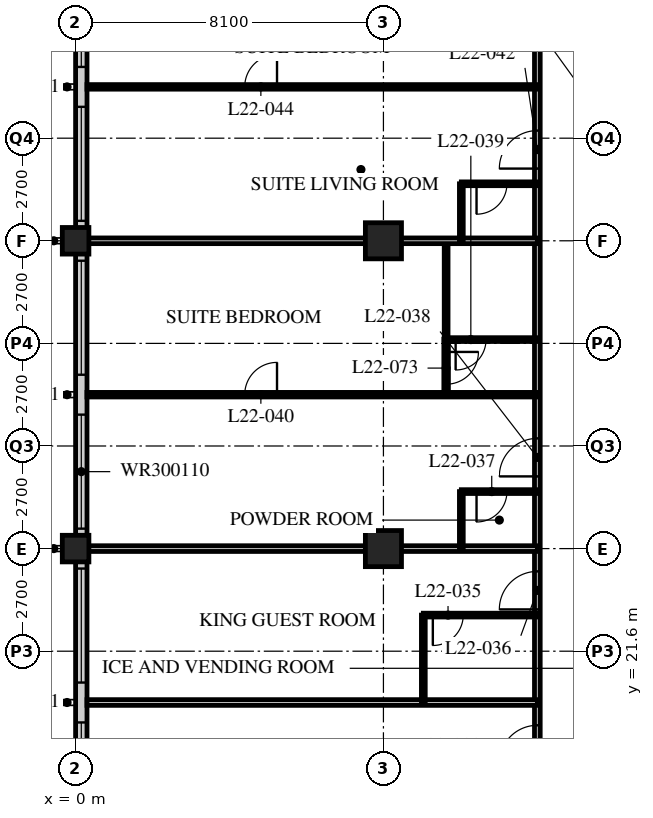
"""IFC4 building model, lengths in metres.
Left out: names, types, materials, properties, quantities, classifications, styles, units other than length and angle.
Written with IfcOpenShell. Run it as: python <this file> out.ifc"""

import sys

from ifc_helpers import new_model, si_unit, direction, frame, frame_2d, origin, origin_2d, place, context, subcontext, project, spatial, rectangle, hollow_rectangle, extrude, element, fill, save


model = new_model("IFC4")
c1 = context("Model", 3, precision=1e-05, world=origin(), true_north=direction((0.0, 1.0)))
c2 = subcontext(c1, "Body", "Model", "MODEL_VIEW")
j1 = project(units=[si_unit("LENGTHUNIT", "METRE"), si_unit("PLANEANGLEUNIT", "RADIAN")], contexts=[c1])
p1 = place(None, origin())
s1 = spatial("IfcSite", under=j1, at=p1, CompositionType="ELEMENT")
p2 = place(p1, origin())
s2 = spatial("IfcBuilding", under=s1, at=p2, CompositionType="ELEMENT")
p3 = place(p2, frame((0.0, 0.0, 87.4)))
s3 = spatial("IfcBuildingStorey", under=s2, at=p3, CompositionType="ELEMENT", Elevation=87.4)
for number, where, z_axis, x_axis in (
    (1, (0.0, 24.3, 0.0), (0.0, 0.0, 1.0), (1.0, 0.0, 0.0)),
    (2, (0.0, 32.4, 0.0), (0.0, 0.0, 1.0), (1.0, 0.0, 0.0)),
):
    element("IfcColumn", number, at=place(p3, frame(where, z_axis=z_axis, x_axis=x_axis)), inside=s3, PredefinedType="COLUMN", context=c2, shape_type="SweptSolid", body=[
        extrude(hollow_rectangle(XDim=0.7, YDim=0.7, WallThickness=0.06, at=origin_2d()), origin(), (0.0, 0.0, 1.0), 3.4),
    ])
for number, where, z_axis, x_axis in (
    (3, (8.1, 24.3, 0.0), (0.0, 0.0, 1.0), (1.0, 0.0, 0.0)),
    (4, (8.1, 32.4, 0.0), (0.0, 0.0, 1.0), (1.0, 0.0, 0.0)),
):
    element("IfcColumn", number, at=place(p3, frame(where, z_axis=z_axis, x_axis=x_axis)), inside=s3, PredefinedType="COLUMN", context=c2, shape_type="SweptSolid", body=[
        extrude(hollow_rectangle(XDim=0.95, YDim=0.95, WallThickness=0.095, at=origin_2d()), origin(), (0.0, 0.0, 1.0), 3.4),
    ])
p4 = place(p3, frame((0.15, 40.2, 0.0), z_axis=(0.0, 0.0, 1.0), x_axis=(0.0, -1.0, 0.0)))
e5 = element("IfcWall", 5, at=p4, inside=s3, PredefinedType="SOLIDWALL", context=c2, shape_type="SweptSolid", body=[
    extrude(rectangle(XDim=32.1, YDim=0.3, at=frame_2d((16.05, 0.0))), origin(), (0.0, 0.0, 1.0), 2.05),
])
p5 = place(p4, frame((0.225, 0.0, 0.9)))
e6 = element("IfcOpeningElement", 6, at=p5, cuts=e5, PredefinedType="OPENING", context=c2, shape_type="SweptSolid", body=[
    extrude(rectangle(XDim=3.0, YDim=1.1, at=frame_2d((1.5, 0.55))), frame((0.0, 0.16, 0.0), z_axis=(0.0, -1.0, 0.0), x_axis=(1.0, 0.0, 0.0)), (0.0, 0.0, 1.0), 0.32),
])
p6 = place(p4, frame((4.275, 0.0, 0.9)))
e7 = element("IfcOpeningElement", 7, at=p6, cuts=e5, PredefinedType="OPENING", context=c2, shape_type="SweptSolid", body=[
    extrude(rectangle(XDim=3.0, YDim=1.1, at=frame_2d((1.5, 0.55))), frame((0.0, 0.16, 0.0), z_axis=(0.0, -1.0, 0.0), x_axis=(1.0, 0.0, 0.0)), (0.0, 0.0, 1.0), 0.32),
])
p7 = place(p4, frame((8.325, 0.0, 0.9)))
e8 = element("IfcOpeningElement", 8, at=p7, cuts=e5, PredefinedType="OPENING", context=c2, shape_type="SweptSolid", body=[
    extrude(rectangle(XDim=3.0, YDim=1.1, at=frame_2d((1.5, 0.55))), frame((0.0, 0.16, 0.0), z_axis=(0.0, -1.0, 0.0), x_axis=(1.0, 0.0, 0.0)), (0.0, 0.0, 1.0), 0.32),
])
p8 = place(p4, frame((12.375, 0.0, 0.9)))
e9 = element("IfcOpeningElement", 9, at=p8, cuts=e5, PredefinedType="OPENING", context=c2, shape_type="SweptSolid", body=[
    extrude(rectangle(XDim=3.0, YDim=1.1, at=frame_2d((1.5, 0.55))), frame((0.0, 0.16, 0.0), z_axis=(0.0, -1.0, 0.0), x_axis=(1.0, 0.0, 0.0)), (0.0, 0.0, 1.0), 0.32),
])
p9 = place(p4, frame((16.425, 0.0, 0.9)))
e10 = element("IfcOpeningElement", 10, at=p9, cuts=e5, PredefinedType="OPENING", context=c2, shape_type="SweptSolid", body=[
    extrude(rectangle(XDim=3.0, YDim=1.1, at=frame_2d((1.5, 0.55))), frame((0.0, 0.16, 0.0), z_axis=(0.0, -1.0, 0.0), x_axis=(1.0, 0.0, 0.0)), (0.0, 0.0, 1.0), 0.32),
])
p10 = place(p4, frame((20.475, 0.0, 0.9)))
e11 = element("IfcOpeningElement", 11, at=p10, cuts=e5, PredefinedType="OPENING", context=c2, shape_type="SweptSolid", body=[
    extrude(rectangle(XDim=3.0, YDim=1.1, at=frame_2d((1.5, 0.55))), frame((0.0, 0.16, 0.0), z_axis=(0.0, -1.0, 0.0), x_axis=(1.0, 0.0, 0.0)), (0.0, 0.0, 1.0), 0.32),
])
p11 = place(p4, frame((24.525, 0.0, 0.9)))
e12 = element("IfcOpeningElement", 12, at=p11, cuts=e5, PredefinedType="OPENING", context=c2, shape_type="SweptSolid", body=[
    extrude(rectangle(XDim=3.0, YDim=1.1, at=frame_2d((1.5, 0.55))), frame((0.0, 0.16, 0.0), z_axis=(0.0, -1.0, 0.0), x_axis=(1.0, 0.0, 0.0)), (0.0, 0.0, 1.0), 0.32),
])
p12 = place(p4, frame((28.575, 0.0, 0.9)))
e13 = element("IfcOpeningElement", 13, at=p12, cuts=e5, PredefinedType="OPENING", context=c2, shape_type="SweptSolid", body=[
    extrude(rectangle(XDim=3.0, YDim=1.1, at=frame_2d((1.5, 0.55))), frame((0.0, 0.16, 0.0), z_axis=(0.0, -1.0, 0.0), x_axis=(1.0, 0.0, 0.0)), (0.0, 0.0, 1.0), 0.32),
])
p13 = place(p3, frame((12.15, 16.2, 0.0), z_axis=(0.0, 0.0, 1.0), x_axis=(0.0, 1.0, 0.0)))
e14 = element("IfcWall", 14, at=p13, inside=s3, PredefinedType="PARTITIONING", context=c2, shape_type="SweptSolid", body=[
    extrude(rectangle(XDim=26.1, YDim=0.15, at=frame_2d((13.05, 0.0))), origin(), (0.0, 0.0, 1.0), 3.15),
])
p14 = place(p13, frame((2.45, 0.0, 0.0)))
e15 = element("IfcOpeningElement", 15, at=p14, cuts=e14, PredefinedType="OPENING", context=c2, shape_type="SweptSolid", body=[
    extrude(rectangle(XDim=1.0, YDim=2.1, at=frame_2d((0.5, 1.05))), frame((0.0, 0.085, 0.0), z_axis=(0.0, -1.0, 0.0), x_axis=(1.0, 0.0, 0.0)), (0.0, 0.0, 1.0), 0.17),
])
p15 = place(p13, frame((6.5, 0.0, 0.0)))
e16 = element("IfcOpeningElement", 16, at=p15, cuts=e14, PredefinedType="OPENING", context=c2, shape_type="SweptSolid", body=[
    extrude(rectangle(XDim=1.0, YDim=2.1, at=frame_2d((0.5, 1.05))), frame((0.0, 0.085, 0.0), z_axis=(0.0, -1.0, 0.0), x_axis=(1.0, 0.0, 0.0)), (0.0, 0.0, 1.0), 0.17),
])
p16 = place(p13, frame((10.0, 0.0, 0.0)))
e17 = element("IfcOpeningElement", 17, at=p16, cuts=e14, PredefinedType="OPENING", context=c2, shape_type="SweptSolid", body=[
    extrude(rectangle(XDim=1.0, YDim=2.1, at=frame_2d((0.5, 1.05))), frame((0.0, 0.085, 0.0), z_axis=(0.0, -1.0, 0.0), x_axis=(1.0, 0.0, 0.0)), (0.0, 0.0, 1.0), 0.17),
])
p17 = place(p13, frame((18.1, 0.0, 0.0)))
e18 = element("IfcOpeningElement", 18, at=p17, cuts=e14, PredefinedType="OPENING", context=c2, shape_type="SweptSolid", body=[
    extrude(rectangle(XDim=1.0, YDim=2.1, at=frame_2d((0.5, 1.05))), frame((0.0, 0.085, 0.0), z_axis=(0.0, -1.0, 0.0), x_axis=(1.0, 0.0, 0.0)), (0.0, 0.0, 1.0), 0.17),
])
p18 = place(p3, frame((12.15, 20.25, 0.0), z_axis=(0.0, 0.0, 1.0), x_axis=(-1.0, 0.0, 0.0)))
e19 = element("IfcWall", 19, at=p18, inside=s3, PredefinedType="PARTITIONING", context=c2, shape_type="SweptSolid", body=[
    extrude(rectangle(XDim=11.85, YDim=0.15, at=frame_2d((5.925, 0.0))), origin(), (0.0, 0.0, 1.0), 3.15),
])
p19 = place(p3, frame((9.15, 20.25, 0.0), z_axis=(0.0, 0.0, 1.0), x_axis=(0.0, 1.0, 0.0)))
e20 = element("IfcWall", 20, at=p19, inside=s3, PredefinedType="PARTITIONING", context=c2, shape_type="SweptSolid", body=[
    extrude(rectangle(XDim=2.3, YDim=0.1, at=frame_2d((1.15, 0.0))), origin(), (0.0, 0.0, 1.0), 3.15),
])
p20 = place(p3, frame((12.15, 22.55, 0.0), z_axis=(0.0, 0.0, 1.0), x_axis=(-1.0, 0.0, 0.0)))
e21 = element("IfcWall", 21, at=p20, inside=s3, PredefinedType="PARTITIONING", context=c2, shape_type="SweptSolid", body=[
    extrude(rectangle(XDim=3.0, YDim=0.1, at=frame_2d((1.5, 0.0))), origin(), (0.0, 0.0, 1.0), 3.15),
])
p21 = place(p20, frame((1.95, 0.0, 0.0)))
e22 = element("IfcOpeningElement", 22, at=p21, cuts=e21, PredefinedType="OPENING", context=c2, shape_type="SweptSolid", body=[
    extrude(rectangle(XDim=0.8, YDim=2.1, at=frame_2d((0.4, 1.05))), frame((0.0, 0.06, 0.0), z_axis=(0.0, -1.0, 0.0), x_axis=(1.0, 0.0, 0.0)), (0.0, 0.0, 1.0), 0.12),
])
p22 = place(p3, frame((12.15, 24.3, 0.0), z_axis=(0.0, 0.0, 1.0), x_axis=(-1.0, 0.0, 0.0)))
e23 = element("IfcWall", 23, at=p22, inside=s3, PredefinedType="PARTITIONING", context=c2, shape_type="SweptSolid", body=[
    extrude(rectangle(XDim=11.85, YDim=0.15, at=frame_2d((5.925, 0.0))), origin(), (0.0, 0.0, 1.0), 2.05),
])
p23 = place(p3, frame((10.15, 24.3, 0.0), z_axis=(0.0, 0.0, 1.0), x_axis=(0.0, 1.0, 0.0)))
e24 = element("IfcWall", 24, at=p23, inside=s3, PredefinedType="PARTITIONING", context=c2, shape_type="SweptSolid", body=[
    extrude(rectangle(XDim=1.5, YDim=0.1, at=frame_2d((0.75, 0.0))), origin(), (0.0, 0.0, 1.0), 3.15),
])
p24 = place(p3, frame((12.15, 25.8, 0.0), z_axis=(0.0, 0.0, 1.0), x_axis=(-1.0, 0.0, 0.0)))
e25 = element("IfcWall", 25, at=p24, inside=s3, PredefinedType="PARTITIONING", context=c2, shape_type="SweptSolid", body=[
    extrude(rectangle(XDim=2.0, YDim=0.1, at=frame_2d((1.0, 0.0))), origin(), (0.0, 0.0, 1.0), 3.15),
])
p25 = place(p24, frame((0.8, 0.0, 0.0)))
e26 = element("IfcOpeningElement", 26, at=p25, cuts=e25, PredefinedType="OPENING", context=c2, shape_type="SweptSolid", body=[
    extrude(rectangle(XDim=0.8, YDim=2.1, at=frame_2d((0.4, 1.05))), frame((0.0, 0.06, 0.0), z_axis=(0.0, -1.0, 0.0), x_axis=(1.0, 0.0, 0.0)), (0.0, 0.0, 1.0), 0.12),
])
p26 = place(p3, frame((9.75, 29.8, 0.0), z_axis=(0.0, 0.0, 1.0), x_axis=(0.0, 1.0, 0.0)))
e27 = element("IfcWall", 27, at=p26, inside=s3, PredefinedType="PARTITIONING", context=c2, shape_type="SweptSolid", body=[
    extrude(rectangle(XDim=2.6, YDim=0.1, at=frame_2d((1.3, 0.0))), origin(), (0.0, 0.0, 1.0), 3.15),
])
p27 = place(p3, frame((12.15, 29.8, 0.0), z_axis=(0.0, 0.0, 1.0), x_axis=(-1.0, 0.0, 0.0)))
e28 = element("IfcWall", 28, at=p27, inside=s3, PredefinedType="PARTITIONING", context=c2, shape_type="SweptSolid", body=[
    extrude(rectangle(XDim=2.4, YDim=0.1, at=frame_2d((1.2, 0.0))), origin(), (0.0, 0.0, 1.0), 3.15),
])
p28 = place(p27, frame((1.35, 0.0, 0.0)))
e29 = element("IfcOpeningElement", 29, at=p28, cuts=e28, PredefinedType="OPENING", context=c2, shape_type="SweptSolid", body=[
    extrude(rectangle(XDim=0.8, YDim=2.1, at=frame_2d((0.4, 1.05))), frame((0.0, 0.06, 0.0), z_axis=(0.0, -1.0, 0.0), x_axis=(1.0, 0.0, 0.0)), (0.0, 0.0, 1.0), 0.12),
])
p29 = place(p3, frame((12.15, 28.35, 0.0), z_axis=(0.0, 0.0, 1.0), x_axis=(-1.0, 0.0, 0.0)))
e30 = element("IfcWall", 30, at=p29, inside=s3, PredefinedType="PARTITIONING", context=c2, shape_type="SweptSolid", body=[
    extrude(rectangle(XDim=11.85, YDim=0.12, at=frame_2d((5.925, 0.0))), origin(), (0.0, 0.0, 1.0), 3.15),
])
p30 = place(p29, frame((6.85, 0.0, 0.0)))
e31 = element("IfcOpeningElement", 31, at=p30, cuts=e30, PredefinedType="OPENING", context=c2, shape_type="SweptSolid", body=[
    extrude(rectangle(XDim=0.85, YDim=2.1, at=frame_2d((0.425, 1.05))), frame((0.0, 0.07, 0.0), z_axis=(0.0, -1.0, 0.0), x_axis=(1.0, 0.0, 0.0)), (0.0, 0.0, 1.0), 0.14),
])
p31 = place(p3, frame((12.15, 32.4, 0.0), z_axis=(0.0, 0.0, 1.0), x_axis=(-1.0, 0.0, 0.0)))
e32 = element("IfcWall", 32, at=p31, inside=s3, PredefinedType="PARTITIONING", context=c2, shape_type="SweptSolid", body=[
    extrude(rectangle(XDim=11.85, YDim=0.15, at=frame_2d((5.925, 0.0))), origin(), (0.0, 0.0, 1.0), 2.388),
])
p32 = place(p3, frame((10.15, 32.4, 0.0), z_axis=(0.0, 0.0, 1.0), x_axis=(0.0, 1.0, 0.0)))
e33 = element("IfcWall", 33, at=p32, inside=s3, PredefinedType="PARTITIONING", context=c2, shape_type="SweptSolid", body=[
    extrude(rectangle(XDim=1.5, YDim=0.1, at=frame_2d((0.75, 0.0))), origin(), (0.0, 0.0, 1.0), 3.15),
])
p33 = place(p3, frame((12.15, 33.9, 0.0), z_axis=(0.0, 0.0, 1.0), x_axis=(-1.0, 0.0, 0.0)))
e34 = element("IfcWall", 34, at=p33, inside=s3, PredefinedType="PARTITIONING", context=c2, shape_type="SweptSolid", body=[
    extrude(rectangle(XDim=2.0, YDim=0.1, at=frame_2d((1.0, 0.0))), origin(), (0.0, 0.0, 1.0), 3.15),
])
p34 = place(p33, frame((0.8, 0.0, 0.0)))
e35 = element("IfcOpeningElement", 35, at=p34, cuts=e34, PredefinedType="OPENING", context=c2, shape_type="SweptSolid", body=[
    extrude(rectangle(XDim=0.8, YDim=2.1, at=frame_2d((0.4, 1.05))), frame((0.0, 0.06, 0.0), z_axis=(0.0, -1.0, 0.0), x_axis=(1.0, 0.0, 0.0)), (0.0, 0.0, 1.0), 0.12),
])
p35 = place(p3, frame((12.15, 36.45, 0.0), z_axis=(0.0, 0.0, 1.0), x_axis=(-1.0, 0.0, 0.0)))
e36 = element("IfcWall", 36, at=p35, inside=s3, PredefinedType="PARTITIONING", context=c2, shape_type="SweptSolid", body=[
    extrude(rectangle(XDim=11.85, YDim=0.12, at=frame_2d((5.925, 0.0))), origin(), (0.0, 0.0, 1.0), 3.15),
])
p36 = place(p35, frame((6.85, 0.0, 0.0)))
e37 = element("IfcOpeningElement", 37, at=p36, cuts=e36, PredefinedType="OPENING", context=c2, shape_type="SweptSolid", body=[
    extrude(rectangle(XDim=0.85, YDim=2.1, at=frame_2d((0.425, 1.05))), frame((0.0, 0.07, 0.0), z_axis=(0.0, -1.0, 0.0), x_axis=(1.0, 0.0, 0.0)), (0.0, 0.0, 1.0), 0.14),
])
p37 = place(p3, frame((9.75, 28.35, 0.0), z_axis=(0.0, 0.0, 1.0), x_axis=(0.0, 1.0, 0.0)))
e38 = element("IfcWall", 38, at=p37, inside=s3, PredefinedType="PARTITIONING", context=c2, shape_type="SweptSolid", body=[
    extrude(rectangle(XDim=1.46, YDim=0.12, at=frame_2d((0.73, 0.0))), origin(), (0.0, 0.0, 1.0), 3.15),
])
p38 = place(p37, frame((0.275, 0.0, 0.0)))
e39 = element("IfcOpeningElement", 39, at=p38, cuts=e38, PredefinedType="OPENING", context=c2, shape_type="SweptSolid", body=[
    extrude(rectangle(XDim=0.85, YDim=2.1, at=frame_2d((0.425, 1.05))), frame((0.0, 0.07, 0.0), z_axis=(0.0, -1.0, 0.0), x_axis=(1.0, 0.0, 0.0)), (0.0, 0.0, 1.0), 0.14),
])
p39 = place(p5, origin())
e40 = element("IfcWindow", 40, at=p39, inside=s3, PartitioningType="SINGLE_PANEL", PredefinedType="WINDOW", context=c2, shape_type="SweptSolid", body=[
    extrude(rectangle(XDim=3.0, YDim=1.1, at=frame_2d((1.5, 0.55))), frame((0.0, 0.03, 0.0), z_axis=(0.0, -1.0, 0.0), x_axis=(1.0, 0.0, 0.0)), (0.0, 0.0, 1.0), 0.06),
])
fill(e6, e40)
p40 = place(p6, origin())
e41 = element("IfcWindow", 41, at=p40, inside=s3, PartitioningType="SINGLE_PANEL", PredefinedType="WINDOW", context=c2, shape_type="SweptSolid", body=[
    extrude(rectangle(XDim=3.0, YDim=1.1, at=frame_2d((1.5, 0.55))), frame((0.0, 0.03, 0.0), z_axis=(0.0, -1.0, 0.0), x_axis=(1.0, 0.0, 0.0)), (0.0, 0.0, 1.0), 0.06),
])
fill(e7, e41)
p41 = place(p7, origin())
e42 = element("IfcWindow", 42, at=p41, inside=s3, PartitioningType="SINGLE_PANEL", PredefinedType="WINDOW", context=c2, shape_type="SweptSolid", body=[
    extrude(rectangle(XDim=3.0, YDim=1.1, at=frame_2d((1.5, 0.55))), frame((0.0, 0.03, 0.0), z_axis=(0.0, -1.0, 0.0), x_axis=(1.0, 0.0, 0.0)), (0.0, 0.0, 1.0), 0.06),
])
fill(e8, e42)
p42 = place(p8, origin())
e43 = element("IfcWindow", 43, at=p42, inside=s3, PartitioningType="SINGLE_PANEL", PredefinedType="WINDOW", context=c2, shape_type="SweptSolid", body=[
    extrude(rectangle(XDim=3.0, YDim=1.1, at=frame_2d((1.5, 0.55))), frame((0.0, 0.03, 0.0), z_axis=(0.0, -1.0, 0.0), x_axis=(1.0, 0.0, 0.0)), (0.0, 0.0, 1.0), 0.06),
])
fill(e9, e43)
p43 = place(p9, origin())
e44 = element("IfcWindow", 44, at=p43, inside=s3, PartitioningType="SINGLE_PANEL", PredefinedType="WINDOW", context=c2, shape_type="SweptSolid", body=[
    extrude(rectangle(XDim=3.0, YDim=1.1, at=frame_2d((1.5, 0.55))), frame((0.0, 0.03, 0.0), z_axis=(0.0, -1.0, 0.0), x_axis=(1.0, 0.0, 0.0)), (0.0, 0.0, 1.0), 0.06),
])
fill(e10, e44)
p44 = place(p10, origin())
e45 = element("IfcWindow", 45, at=p44, inside=s3, PartitioningType="SINGLE_PANEL", PredefinedType="WINDOW", context=c2, shape_type="SweptSolid", body=[
    extrude(rectangle(XDim=3.0, YDim=1.1, at=frame_2d((1.5, 0.55))), frame((0.0, 0.03, 0.0), z_axis=(0.0, -1.0, 0.0), x_axis=(1.0, 0.0, 0.0)), (0.0, 0.0, 1.0), 0.06),
])
fill(e11, e45)
p45 = place(p14, origin())
e46 = element("IfcDoor", 46, at=p45, inside=s3, OperationType="SINGLE_SWING_LEFT", PredefinedType="DOOR", context=c2, shape_type="SweptSolid", body=[
    extrude(rectangle(XDim=1.0, YDim=2.1, at=frame_2d((0.5, 1.05))), frame((0.0, 0.025, 0.0), z_axis=(0.0, -1.0, 0.0), x_axis=(1.0, 0.0, 0.0)), (0.0, 0.0, 1.0), 0.05),
])
fill(e15, e46)
p46 = place(p21, origin())
e47 = element("IfcDoor", 47, at=p46, inside=s3, OperationType="SINGLE_SWING_RIGHT", PredefinedType="DOOR", context=c2, shape_type="SweptSolid", body=[
    extrude(rectangle(XDim=0.8, YDim=2.1, at=frame_2d((0.4, 1.05))), frame((0.0, 0.025, 0.0), z_axis=(0.0, -1.0, 0.0), x_axis=(1.0, 0.0, 0.0)), (0.0, 0.0, 1.0), 0.05),
])
fill(e22, e47)
p47 = place(p15, origin())
e48 = element("IfcDoor", 48, at=p47, inside=s3, OperationType="SINGLE_SWING_LEFT", PredefinedType="DOOR", context=c2, shape_type="SweptSolid", body=[
    extrude(rectangle(XDim=1.0, YDim=2.1, at=frame_2d((0.5, 1.05))), frame((0.0, 0.025, 0.0), z_axis=(0.0, -1.0, 0.0), x_axis=(1.0, 0.0, 0.0)), (0.0, 0.0, 1.0), 0.05),
])
fill(e16, e48)
p48 = place(p25, origin())
e49 = element("IfcDoor", 49, at=p48, inside=s3, OperationType="SINGLE_SWING_RIGHT", PredefinedType="DOOR", context=c2, shape_type="SweptSolid", body=[
    extrude(rectangle(XDim=0.8, YDim=2.1, at=frame_2d((0.4, 1.05))), frame((0.0, 0.025, 0.0), z_axis=(0.0, -1.0, 0.0), x_axis=(1.0, 0.0, 0.0)), (0.0, 0.0, 1.0), 0.05),
])
fill(e26, e49)
p49 = place(p16, origin())
e50 = element("IfcDoor", 50, at=p49, inside=s3, OperationType="SINGLE_SWING_LEFT", PredefinedType="DOOR", context=c2, shape_type="SweptSolid", body=[
    extrude(rectangle(XDim=1.0, YDim=2.1, at=frame_2d((0.5, 1.05))), frame((0.0, 0.025, 0.0), z_axis=(0.0, -1.0, 0.0), x_axis=(1.0, 0.0, 0.0)), (0.0, 0.0, 1.0), 0.05),
])
fill(e17, e50)
p50 = place(p28, origin())
e51 = element("IfcDoor", 51, at=p50, inside=s3, OperationType="SINGLE_SWING_RIGHT", PredefinedType="DOOR", context=c2, shape_type="SweptSolid", body=[
    extrude(rectangle(XDim=0.8, YDim=2.1, at=frame_2d((0.4, 1.05))), frame((0.0, 0.025, 0.0), z_axis=(0.0, -1.0, 0.0), x_axis=(1.0, 0.0, 0.0)), (0.0, 0.0, 1.0), 0.05),
])
fill(e29, e51)
p51 = place(p30, origin())
e52 = element("IfcDoor", 52, at=p51, inside=s3, OperationType="SINGLE_SWING_RIGHT", PredefinedType="DOOR", context=c2, shape_type="SweptSolid", body=[
    extrude(rectangle(XDim=0.85, YDim=2.1, at=frame_2d((0.425, 1.05))), frame((0.0, 0.025, 0.0), z_axis=(0.0, -1.0, 0.0), x_axis=(1.0, 0.0, 0.0)), (0.0, 0.0, 1.0), 0.05),
])
fill(e31, e52)
p52 = place(p34, origin())
e53 = element("IfcDoor", 53, at=p52, inside=s3, OperationType="SINGLE_SWING_RIGHT", PredefinedType="DOOR", context=c2, shape_type="SweptSolid", body=[
    extrude(rectangle(XDim=0.8, YDim=2.1, at=frame_2d((0.4, 1.05))), frame((0.0, 0.025, 0.0), z_axis=(0.0, -1.0, 0.0), x_axis=(1.0, 0.0, 0.0)), (0.0, 0.0, 1.0), 0.05),
])
fill(e35, e53)
p53 = place(p17, origin())
e54 = element("IfcDoor", 54, at=p53, inside=s3, OperationType="SINGLE_SWING_LEFT", PredefinedType="DOOR", context=c2, shape_type="SweptSolid", body=[
    extrude(rectangle(XDim=1.0, YDim=2.1, at=frame_2d((0.5, 1.05))), frame((0.0, 0.025, 0.0), z_axis=(0.0, -1.0, 0.0), x_axis=(1.0, 0.0, 0.0)), (0.0, 0.0, 1.0), 0.05),
])
fill(e18, e54)
p54 = place(p36, origin())
e55 = element("IfcDoor", 55, at=p54, inside=s3, OperationType="SINGLE_SWING_RIGHT", PredefinedType="DOOR", context=c2, shape_type="SweptSolid", body=[
    extrude(rectangle(XDim=0.85, YDim=2.1, at=frame_2d((0.425, 1.05))), frame((0.0, 0.025, 0.0), z_axis=(0.0, -1.0, 0.0), x_axis=(1.0, 0.0, 0.0)), (0.0, 0.0, 1.0), 0.05),
])
fill(e37, e55)
p55 = place(p38, origin())
e56 = element("IfcDoor", 56, at=p55, inside=s3, OperationType="SINGLE_SWING_LEFT", PredefinedType="DOOR", context=c2, shape_type="SweptSolid", body=[
    extrude(rectangle(XDim=0.85, YDim=2.1, at=frame_2d((0.425, 1.05))), frame((0.0, 0.025, 0.0), z_axis=(0.0, -1.0, 0.0), x_axis=(1.0, 0.0, 0.0)), (0.0, 0.0, 1.0), 0.05),
])
fill(e39, e56)
save(model, sys.argv[1])
